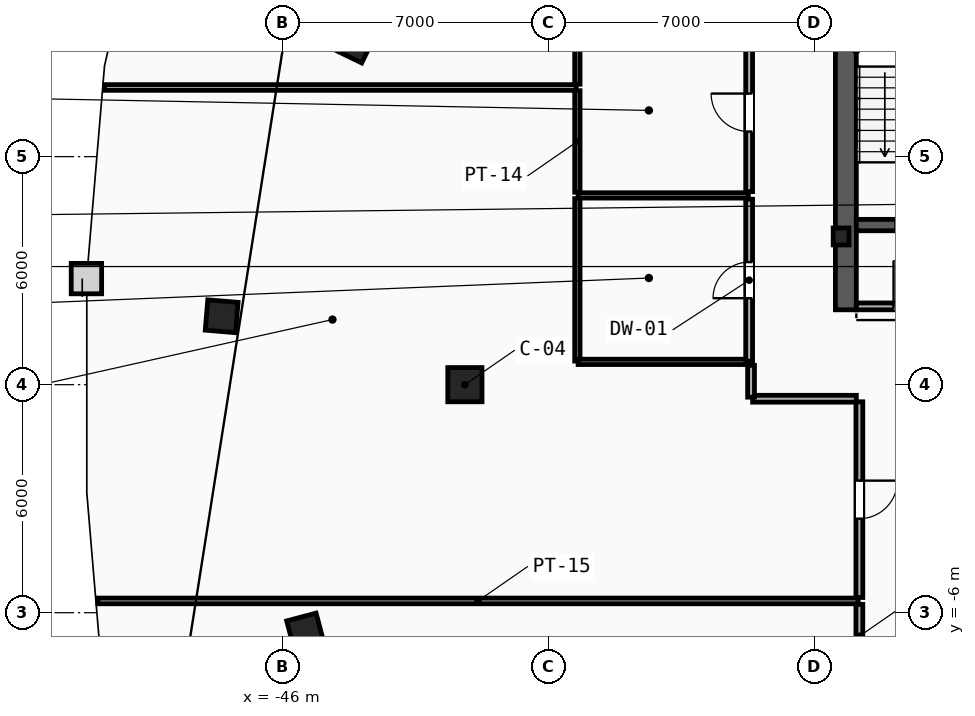
"""IFC4 building model, lengths in metres.
Left out: names, types, materials, properties, quantities, classifications, styles, units other than length and angle.
Written with IfcOpenShell. Run it as: python <this file> out.ifc"""

import sys

from ifc_helpers import new_model, si_unit, direction, frame, frame_2d, origin, origin_2d, place, context, subcontext, project, spatial, rectangle, i_section, extrude, element, fill, save


model = new_model("IFC4")
c1 = context("Model", 3, precision=1e-05, world=origin(), true_north=direction((0.0, 1.0)))
c2 = subcontext(c1, "Body", "Model", "MODEL_VIEW")
j1 = project(units=[si_unit("LENGTHUNIT", "METRE"), si_unit("PLANEANGLEUNIT", "RADIAN")], contexts=[c1])
p1 = place(None, origin())
s1 = spatial("IfcSite", under=j1, at=p1, CompositionType="ELEMENT")
p2 = place(p1, origin())
s2 = spatial("IfcBuilding", under=s1, at=p2, CompositionType="ELEMENT")
p3 = place(p2, frame((0.0, 0.0, 264.8)))
s3 = spatial("IfcBuildingStorey", under=s2, at=p3, CompositionType="ELEMENT", Elevation=264.8)
p4 = place(p3, frame((-31.3, 3.9, 0.0), z_axis=(0.0, 0.0, 1.0), x_axis=(1.0, 0.0, 0.0)))
e1 = element("IfcColumn", 1, at=p4, inside=s3, PredefinedType="COLUMN", context=c2, shape_type="SweptSolid", body=[
    extrude(i_section(OverallWidth=0.416, OverallDepth=0.446, WebThickness=0.039, FlangeThickness=0.063, FilletRadius=0.018, at=origin_2d()), origin(), (0.0, 0.0, 1.0), 3.6),
])
p5 = place(p3, frame((-41.2, 0.0, 0.0), z_axis=(0.0, 0.0, 1.0), x_axis=(1.0, 0.0, 0.0)))
e2 = element("IfcColumn", 2, at=p5, inside=s3, PredefinedType="COLUMN", context=c2, shape_type="SweptSolid", body=[
    extrude(rectangle(XDim=0.9, YDim=0.9, at=origin_2d()), origin(), (0.0, 0.0, 1.0), 3.6),
])
for number, where, z_axis, x_axis in (
    (3, (-44.1, 9.0, 0.0), (0.0, 0.0, 1.0), (-0.437, -0.899, 0.0)),
    (4, (-47.6, 1.8, 0.0), (0.0, 0.0, 1.0), (-0.084, -0.997, 0.0)),
    (5, (-45.4, -6.5, 0.0), (0.0, 0.0, 1.0), (0.256, -0.967, 0.0)),
):
    element("IfcColumn", number, at=place(p3, frame(where, z_axis=z_axis, x_axis=x_axis)), inside=s3, PredefinedType="COLUMN", context=c2, shape_type="SweptSolid", body=[
        extrude(rectangle(XDim=0.8, YDim=0.8, at=origin_2d()), origin(), (0.0, 0.0, 1.0), 3.6),
    ])
p6 = place(p3, frame((-31.175, 1.97, 0.0), z_axis=(0.0, 0.0, 1.0), x_axis=(0.0, 1.0, 0.0)))
e6 = element("IfcWall", 6, at=p6, inside=s3, PredefinedType="SHEAR", context=c2, shape_type="SweptSolid", body=[
    extrude(rectangle(XDim=13.33, YDim=0.55, at=frame_2d((6.665, 0.0))), origin(), (0.0, 0.0, 1.0), 3.34),
])
p7 = place(p3, frame((-30.9, 4.2, 0.0), z_axis=(0.0, 0.0, 1.0), x_axis=(1.0, 0.0, 0.0)))
e7 = element("IfcWall", 7, at=p7, inside=s3, PredefinedType="SHEAR", context=c2, shape_type="SweptSolid", body=[
    extrude(rectangle(XDim=3.16, YDim=0.3, at=frame_2d((1.58, 0.0))), origin(), (0.0, 0.0, 1.0), 3.34),
])
p8 = place(p7, frame((1.03, 0.0, 0.0)))
e8 = element("IfcOpeningElement", 8, at=p8, cuts=e7, PredefinedType="OPENING", context=c2, shape_type="SweptSolid", body=[
    extrude(rectangle(XDim=1.1, YDim=2.15, at=frame_2d((0.55, 1.075))), frame((0.0, 0.16, 0.0), z_axis=(0.0, -1.0, 0.0), x_axis=(1.0, 0.0, 0.0)), (0.0, 0.0, 1.0), 0.32),
])
p9 = place(p3, frame((-30.9, 2.06, 0.0), z_axis=(0.0, 0.0, 1.0), x_axis=(1.0, 0.0, 0.0)))
e9 = element("IfcWall", 9, at=p9, inside=s3, PredefinedType="PARTITIONING", context=c2, shape_type="SweptSolid", body=[
    extrude(rectangle(XDim=3.16, YDim=0.18, at=frame_2d((1.58, 0.0))), origin(), (0.0, 0.0, 1.0), 3.34),
])
p10 = place(p9, frame((0.98, 0.0, 0.0)))
e10 = element("IfcOpeningElement", 10, at=p10, cuts=e9, PredefinedType="OPENING", context=c2, shape_type="SweptSolid", body=[
    extrude(rectangle(XDim=1.2, YDim=2.15, at=frame_2d((0.6, 1.075))), frame((0.0, 0.1, 0.0), z_axis=(0.0, -1.0, 0.0), x_axis=(1.0, 0.0, 0.0)), (0.0, 0.0, 1.0), 0.2),
])
p11 = place(p3, frame((-38.24, 0.62, 0.0), z_axis=(0.0, 0.0, 1.0), x_axis=(0.0, 1.0, 0.0)))
e11 = element("IfcWall", 11, at=p11, inside=s3, PredefinedType="PARTITIONING", context=c2, shape_type="SweptSolid", body=[
    extrude(rectangle(XDim=4.275, YDim=0.14, at=frame_2d((2.137, 0.0))), origin(), (0.0, 0.0, 1.0), 3.34),
])
p12 = place(p3, frame((-38.24, 5.065, 0.0), z_axis=(0.0, 0.0, 1.0), x_axis=(0.0, 1.0, 0.0)))
e12 = element("IfcWall", 12, at=p12, inside=s3, PredefinedType="PARTITIONING", context=c2, shape_type="SweptSolid", body=[
    extrude(rectangle(XDim=2.67, YDim=0.14, at=frame_2d((1.335, 0.0))), origin(), (0.0, 0.0, 1.0), 3.34),
])
p13 = place(p3, frame((-38.24, 7.905, 0.0), z_axis=(0.0, 0.0, 1.0), x_axis=(0.0, 1.0, 0.0)))
e13 = element("IfcWall", 13, at=p13, inside=s3, PredefinedType="PARTITIONING", context=c2, shape_type="SweptSolid", body=[
    extrude(rectangle(XDim=1.335, YDim=0.14, at=frame_2d((0.667, 0.0))), origin(), (0.0, 0.0, 1.0), 3.34),
])
for number, where, z_axis, x_axis in (
    (14, (-38.22, 0.6, 0.0), (0.0, 0.0, 1.0), (1.0, 0.0, 0.0)),
    (15, (-38.22, 4.98, 0.0), (0.0, 0.0, 1.0), (1.0, 0.0, 0.0)),
):
    element("IfcWall", number, at=place(p3, frame(where, z_axis=z_axis, x_axis=x_axis)), inside=s3, PredefinedType="PARTITIONING", context=c2, shape_type="SweptSolid", body=[
        extrude(rectangle(XDim=4.48, YDim=0.14, at=frame_2d((2.24, 0.0))), origin(), (0.0, 0.0, 1.0), 3.34),
    ])
p14 = place(p3, frame((-33.72, 0.62, 0.0), z_axis=(0.0, 0.0, 1.0), x_axis=(0.0, 1.0, 0.0)))
e16 = element("IfcWall", 16, at=p14, inside=s3, PredefinedType="PARTITIONING", context=c2, shape_type="SweptSolid", body=[
    extrude(rectangle(XDim=4.26, YDim=0.18, at=frame_2d((2.13, 0.0))), origin(), (0.0, 0.0, 1.0), 3.34),
])
p15 = place(p14, frame((1.655, 0.0, 0.0)))
e17 = element("IfcOpeningElement", 17, at=p15, cuts=e16, PredefinedType="OPENING", context=c2, shape_type="SweptSolid", body=[
    extrude(rectangle(XDim=0.95, YDim=2.1, at=frame_2d((0.475, 1.05))), frame((0.0, 0.1, 0.0), z_axis=(0.0, -1.0, 0.0), x_axis=(1.0, 0.0, 0.0)), (0.0, 0.0, 1.0), 0.2),
])
p16 = place(p3, frame((-33.72, 5.08, 0.0), z_axis=(0.0, 0.0, 1.0), x_axis=(0.0, 1.0, 0.0)))
e18 = element("IfcWall", 18, at=p16, inside=s3, PredefinedType="PARTITIONING", context=c2, shape_type="SweptSolid", body=[
    extrude(rectangle(XDim=4.16, YDim=0.18, at=frame_2d((2.08, 0.0))), origin(), (0.0, 0.0, 1.0), 3.34),
])
p17 = place(p16, frame((1.58, 0.0, 0.0)))
e19 = element("IfcOpeningElement", 19, at=p17, cuts=e18, PredefinedType="OPENING", context=c2, shape_type="SweptSolid", body=[
    extrude(rectangle(XDim=1.0, YDim=2.15, at=frame_2d((0.5, 1.075))), frame((0.0, 0.1, 0.0), z_axis=(0.0, -1.0, 0.0), x_axis=(1.0, 0.0, 0.0)), (0.0, 0.0, 1.0), 0.2),
])
p18 = place(p3, frame((-50.86, -5.69, 0.0), z_axis=(0.0, 0.0, 1.0), x_axis=(1.0, 0.0, 0.0)))
e20 = element("IfcWall", 20, at=p18, inside=s3, PredefinedType="PARTITIONING", context=c2, shape_type="SweptSolid", body=[
    extrude(rectangle(XDim=20.01, YDim=0.15, at=frame_2d((10.005, 0.0))), origin(), (0.0, 0.0, 1.0), 3.34),
])
p19 = place(p3, frame((-50.681, 7.82, 0.0), z_axis=(0.0, 0.0, 1.0), x_axis=(1.0, 0.0, 0.0)))
e21 = element("IfcWall", 21, at=p19, inside=s3, PredefinedType="PARTITIONING", context=c2, shape_type="SweptSolid", body=[
    extrude(rectangle(XDim=12.411, YDim=0.15, at=frame_2d((6.205, 0.0))), origin(), (0.0, 0.0, 1.0), 3.34),
])
p20 = place(p3, frame((-30.82, -5.78, 0.0), z_axis=(0.0, 0.0, 1.0), x_axis=(0.0, -1.0, 0.0)))
e22 = element("IfcWall", 22, at=p20, inside=s3, PredefinedType="PARTITIONING", context=c2, shape_type="SweptSolid", body=[
    extrude(rectangle(XDim=6.999, YDim=0.18, at=frame_2d((3.499, 0.0))), origin(), (0.0, 0.0, 1.0), 3.34),
])
p21 = place(p20, frame((2.999, 0.0, 0.0)))
e23 = element("IfcOpeningElement", 23, at=p21, cuts=e22, PredefinedType="OPENING", context=c2, shape_type="SweptSolid", body=[
    extrude(rectangle(XDim=1.0, YDim=2.15, at=frame_2d((0.5, 1.075))), frame((0.0, 0.1, 0.0), z_axis=(0.0, -1.0, 0.0), x_axis=(1.0, 0.0, 0.0)), (0.0, 0.0, 1.0), 0.2),
])
p22 = place(p3, frame((-30.82, -0.45, 0.0), z_axis=(0.0, 0.0, 1.0), x_axis=(0.0, -1.0, 0.0)))
e24 = element("IfcWall", 24, at=p22, inside=s3, PredefinedType="PARTITIONING", context=c2, shape_type="SweptSolid", body=[
    extrude(rectangle(XDim=5.15, YDim=0.18, at=frame_2d((2.575, 0.0))), origin(), (0.0, 0.0, 1.0), 3.34),
])
p23 = place(p22, frame((2.075, 0.0, 0.0)))
e25 = element("IfcOpeningElement", 25, at=p23, cuts=e24, PredefinedType="OPENING", context=c2, shape_type="SweptSolid", body=[
    extrude(rectangle(XDim=1.0, YDim=2.15, at=frame_2d((0.5, 1.075))), frame((0.0, 0.1, 0.0), z_axis=(0.0, -1.0, 0.0), x_axis=(1.0, 0.0, 0.0)), (0.0, 0.0, 1.0), 0.2),
])
p24 = place(p3, frame((-33.628, -0.37, 0.0), z_axis=(0.0, 0.0, 1.0), x_axis=(1.0, 0.0, 0.0)))
e26 = element("IfcWall", 26, at=p24, inside=s3, PredefinedType="PARTITIONING", context=c2, shape_type="SweptSolid", body=[
    extrude(rectangle(XDim=2.729, YDim=0.18, at=frame_2d((1.364, 0.0))), origin(), (0.0, 0.0, 1.0), 3.34),
])
p25 = place(p3, frame((-33.67, 0.509, 0.0), z_axis=(0.0, 0.0, 1.0), x_axis=(0.0, -1.0, 0.0)))
e27 = element("IfcWall", 27, at=p25, inside=s3, PredefinedType="PARTITIONING", context=c2, shape_type="SweptSolid", body=[
    extrude(rectangle(XDim=0.837, YDim=0.18, at=frame_2d((0.418, 0.0))), origin(), (0.0, 0.0, 1.0), 3.34),
])
p26 = place(p10, origin())
e28 = element("IfcDoor", 28, at=p26, inside=s3, OperationType="SINGLE_SWING_LEFT", PredefinedType="DOOR", context=c2, shape_type="SweptSolid", body=[
    extrude(rectangle(XDim=1.2, YDim=2.15, at=frame_2d((0.6, 1.075))), frame((0.0, 0.025, 0.0), z_axis=(0.0, -1.0, 0.0), x_axis=(1.0, 0.0, 0.0)), (0.0, 0.0, 1.0), 0.05),
])
fill(e10, e28)
p27 = place(p23, origin())
e29 = element("IfcDoor", 29, at=p27, inside=s3, OperationType="SINGLE_SWING_LEFT", PredefinedType="DOOR", context=c2, shape_type="SweptSolid", body=[
    extrude(rectangle(XDim=1.0, YDim=2.15, at=frame_2d((0.5, 1.075))), frame((0.0, 0.025, 0.0), z_axis=(0.0, -1.0, 0.0), x_axis=(1.0, 0.0, 0.0)), (0.0, 0.0, 1.0), 0.05),
])
fill(e25, e29)
p28 = place(p15, origin())
e30 = element("IfcDoor", 30, at=p28, inside=s3, OperationType="SINGLE_SWING_LEFT", PredefinedType="DOOR", context=c2, shape_type="SweptSolid", body=[
    extrude(rectangle(XDim=0.95, YDim=2.1, at=frame_2d((0.475, 1.05))), frame((0.0, 0.025, 0.0), z_axis=(0.0, -1.0, 0.0), x_axis=(1.0, 0.0, 0.0)), (0.0, 0.0, 1.0), 0.05),
])
fill(e17, e30)
p29 = place(p17, origin())
e31 = element("IfcDoor", 31, at=p29, inside=s3, OperationType="SINGLE_SWING_RIGHT", PredefinedType="DOOR", context=c2, shape_type="SweptSolid", body=[
    extrude(rectangle(XDim=1.0, YDim=2.15, at=frame_2d((0.5, 1.075))), frame((0.0, 0.025, 0.0), z_axis=(0.0, -1.0, 0.0), x_axis=(1.0, 0.0, 0.0)), (0.0, 0.0, 1.0), 0.05),
])
fill(e19, e31)
save(model, sys.argv[1])
